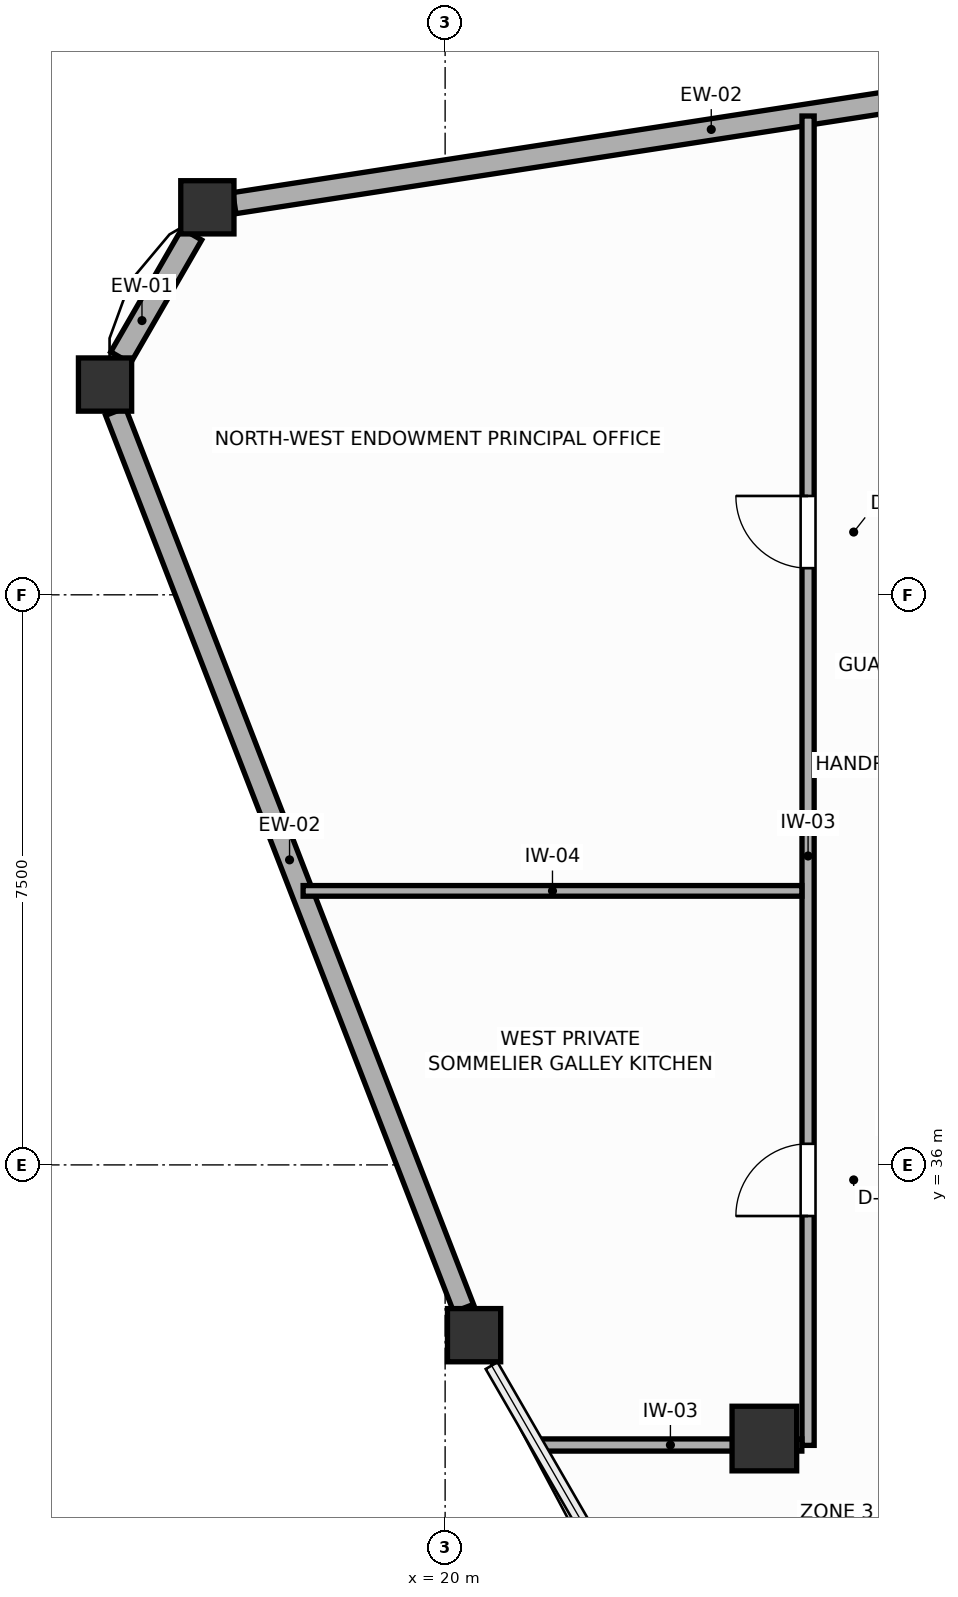
"""IFC4 building model, lengths in metres.
Left out: names, types, materials, properties, quantities, classifications, styles, units other than length and angle.
Written with IfcOpenShell. Run it as: python <this file> out.ifc"""

import sys

from ifc_helpers import new_model, si_unit, direction, frame, frame_2d, origin, origin_2d, place, context, subcontext, project, spatial, rectangle, extrude, source, transform, mapped, element, fill, save


model = new_model("IFC4")
c1 = context("Model", 3, precision=1e-05, world=origin(), true_north=direction((0.0, 1.0)))
c2 = subcontext(c1, "Body", "Model", "MODEL_VIEW")
j1 = project(units=[si_unit("LENGTHUNIT", "METRE"), si_unit("PLANEANGLEUNIT", "RADIAN")], contexts=[c1])
p1 = place(None, origin())
s1 = spatial("IfcSite", under=j1, at=p1, CompositionType="ELEMENT")
p2 = place(p1, origin())
s2 = spatial("IfcBuilding", under=s1, at=p2, CompositionType="ELEMENT")
p3 = place(p2, frame((0.0, 0.0, 268.2)))
s3 = spatial("IfcBuildingStorey", under=s2, at=p3, CompositionType="ELEMENT", Elevation=268.2)
m1 = source(origin(), c2, "Body", "SweptSolid", [
    extrude(rectangle(XDim=0.85, YDim=0.85, at=origin_2d()), origin(), (0.0, 0.0, 1.0), 3.6),
])
p4 = place(p3, frame((24.2, 32.4, 0.0), z_axis=(0.0, 0.0, 1.0), x_axis=(1.0, 0.0, 0.0)))
e1 = element("IfcColumn", 1, at=p4, inside=s3, PredefinedType="COLUMN", context=c2, shape_type="MappedRepresentation", body=[
    mapped(m1, transform((0.0, 0.0, 0.0), scale=1.0)),
])
m2 = source(origin(), c2, "Body", "SweptSolid", [
    extrude(rectangle(XDim=0.7, YDim=0.7, at=origin_2d()), origin(), (0.0, 0.0, 1.0), 3.6),
])
for number, where, z_axis, x_axis in (
    (2, (16.872, 48.598, 0.0), (0.0, 0.0, 1.0), (1.0, 0.0, 0.0)),
    (3, (15.526, 46.266, 0.0), (0.0, 0.0, 1.0), (1.0, 0.0, 0.0)),
    (4, (20.381, 33.76, 0.0), (0.0, 0.0, 1.0), (1.0, 0.0, 0.0)),
):
    element("IfcColumn", number, at=place(p3, frame(where, z_axis=z_axis, x_axis=x_axis)), inside=s3, PredefinedType="COLUMN", context=c2, shape_type="MappedRepresentation", body=[
        mapped(m2, transform((0.0, 0.0, 0.0), scale=1.0)),
    ])
p5 = place(p3, frame((29.775, 50.592, 0.0), z_axis=(0.0, 0.0, 1.0), x_axis=(-0.988271454673, -0.152707340617, 0.0)))
e5 = element("IfcWall", 5, at=p5, inside=s3, PredefinedType="SOLIDWALL", context=c2, shape_type="SweptSolid", body=[
    extrude(rectangle(XDim=12.697, YDim=0.28, at=frame_2d((6.349, 0.0))), origin(), (0.0, 0.0, 1.0), 3.08),
])
p6 = place(p3, frame((16.667, 48.243, 0.0), z_axis=(0.0, 0.0, 1.0), x_axis=(-0.500023421257, -0.866011881093, 0.0)))
e6 = element("IfcWall", 6, at=p6, inside=s3, PredefinedType="SOLIDWALL", context=c2, shape_type="SweptSolid", body=[
    extrude(rectangle(XDim=1.873, YDim=0.3, at=frame_2d((0.936, 0.0))), origin(), (0.0, 0.0, 1.0), 3.08),
])
p7 = place(p3, frame((15.664, 45.911, 0.0), z_axis=(0.0, 0.0, 1.0), x_axis=(0.3618810561, -0.932224276253, 0.0)))
e7 = element("IfcWall", 7, at=p7, inside=s3, PredefinedType="SOLIDWALL", context=c2, shape_type="SweptSolid", body=[
    extrude(rectangle(XDim=12.654, YDim=0.28, at=frame_2d((6.327, 0.0))), origin(), (0.0, 0.0, 1.0), 3.05),
])
p8 = place(p3, frame((24.775, 32.31, 0.0), z_axis=(0.0, 0.0, 1.0), x_axis=(0.0, 1.0, 0.0)))
e8 = element("IfcWall", 8, at=p8, inside=s3, PredefinedType="PARTITIONING", context=c2, shape_type="SweptSolid", body=[
    extrude(rectangle(XDim=17.489, YDim=0.16, at=frame_2d((8.745, 0.0))), origin(), (0.0, 0.0, 1.0), 3.41),
])
p9 = place(p8, frame((3.018, 0.0, 0.0)))
e9 = element("IfcOpeningElement", 9, at=p9, cuts=e8, PredefinedType="OPENING", context=c2, shape_type="SweptSolid", body=[
    extrude(rectangle(XDim=0.95, YDim=2.05, at=frame_2d((0.475, 1.025))), frame((0.0, 0.09, 0.0), z_axis=(0.0, -1.0, 0.0), x_axis=(1.0, 0.0, 0.0)), (0.0, 0.0, 1.0), 0.18),
])
p10 = place(p8, frame((11.541, 0.0, 0.0)))
e10 = element("IfcOpeningElement", 10, at=p10, cuts=e8, PredefinedType="OPENING", context=c2, shape_type="SweptSolid", body=[
    extrude(rectangle(XDim=0.95, YDim=2.05, at=frame_2d((0.475, 1.025))), frame((0.0, 0.09, 0.0), z_axis=(0.0, -1.0, 0.0), x_axis=(1.0, 0.0, 0.0)), (0.0, 0.0, 1.0), 0.18),
])
p11 = place(p3, frame((21.235, 32.315, 0.0), z_axis=(0.0, 0.0, 1.0), x_axis=(1.0, 0.0, 0.0)))
e11 = element("IfcWall", 11, at=p11, inside=s3, PredefinedType="PARTITIONING", context=c2, shape_type="SweptSolid", body=[
    extrude(rectangle(XDim=3.458, YDim=0.16, at=frame_2d((1.729, 0.0))), origin(), (0.0, 0.0, 1.0), 3.08),
])
p12 = place(p3, frame((18.132, 39.605, 0.0), z_axis=(0.0, 0.0, 1.0), x_axis=(1.0, 0.0, 0.0)))
e12 = element("IfcWall", 12, at=p12, inside=s3, PredefinedType="PARTITIONING", context=c2, shape_type="SweptSolid", body=[
    extrude(rectangle(XDim=6.562, YDim=0.14, at=frame_2d((3.281, 0.0))), origin(), (0.0, 0.0, 1.0), 3.41),
])
p13 = place(p9, origin())
e13 = element("IfcDoor", 13, at=p13, inside=s3, OperationType="SINGLE_SWING_LEFT", PredefinedType="DOOR", context=c2, shape_type="SweptSolid", body=[
    extrude(rectangle(XDim=0.95, YDim=2.05, at=frame_2d((0.475, 1.025))), frame((0.0, 0.025, 0.0), z_axis=(0.0, -1.0, 0.0), x_axis=(1.0, 0.0, 0.0)), (0.0, 0.0, 1.0), 0.05),
])
fill(e9, e13)
p14 = place(p10, origin())
e14 = element("IfcDoor", 14, at=p14, inside=s3, OperationType="SINGLE_SWING_RIGHT", PredefinedType="DOOR", context=c2, shape_type="SweptSolid", body=[
    extrude(rectangle(XDim=0.95, YDim=2.05, at=frame_2d((0.475, 1.025))), frame((0.0, 0.025, 0.0), z_axis=(0.0, -1.0, 0.0), x_axis=(1.0, 0.0, 0.0)), (0.0, 0.0, 1.0), 0.05),
])
fill(e10, e14)
save(model, sys.argv[1])
